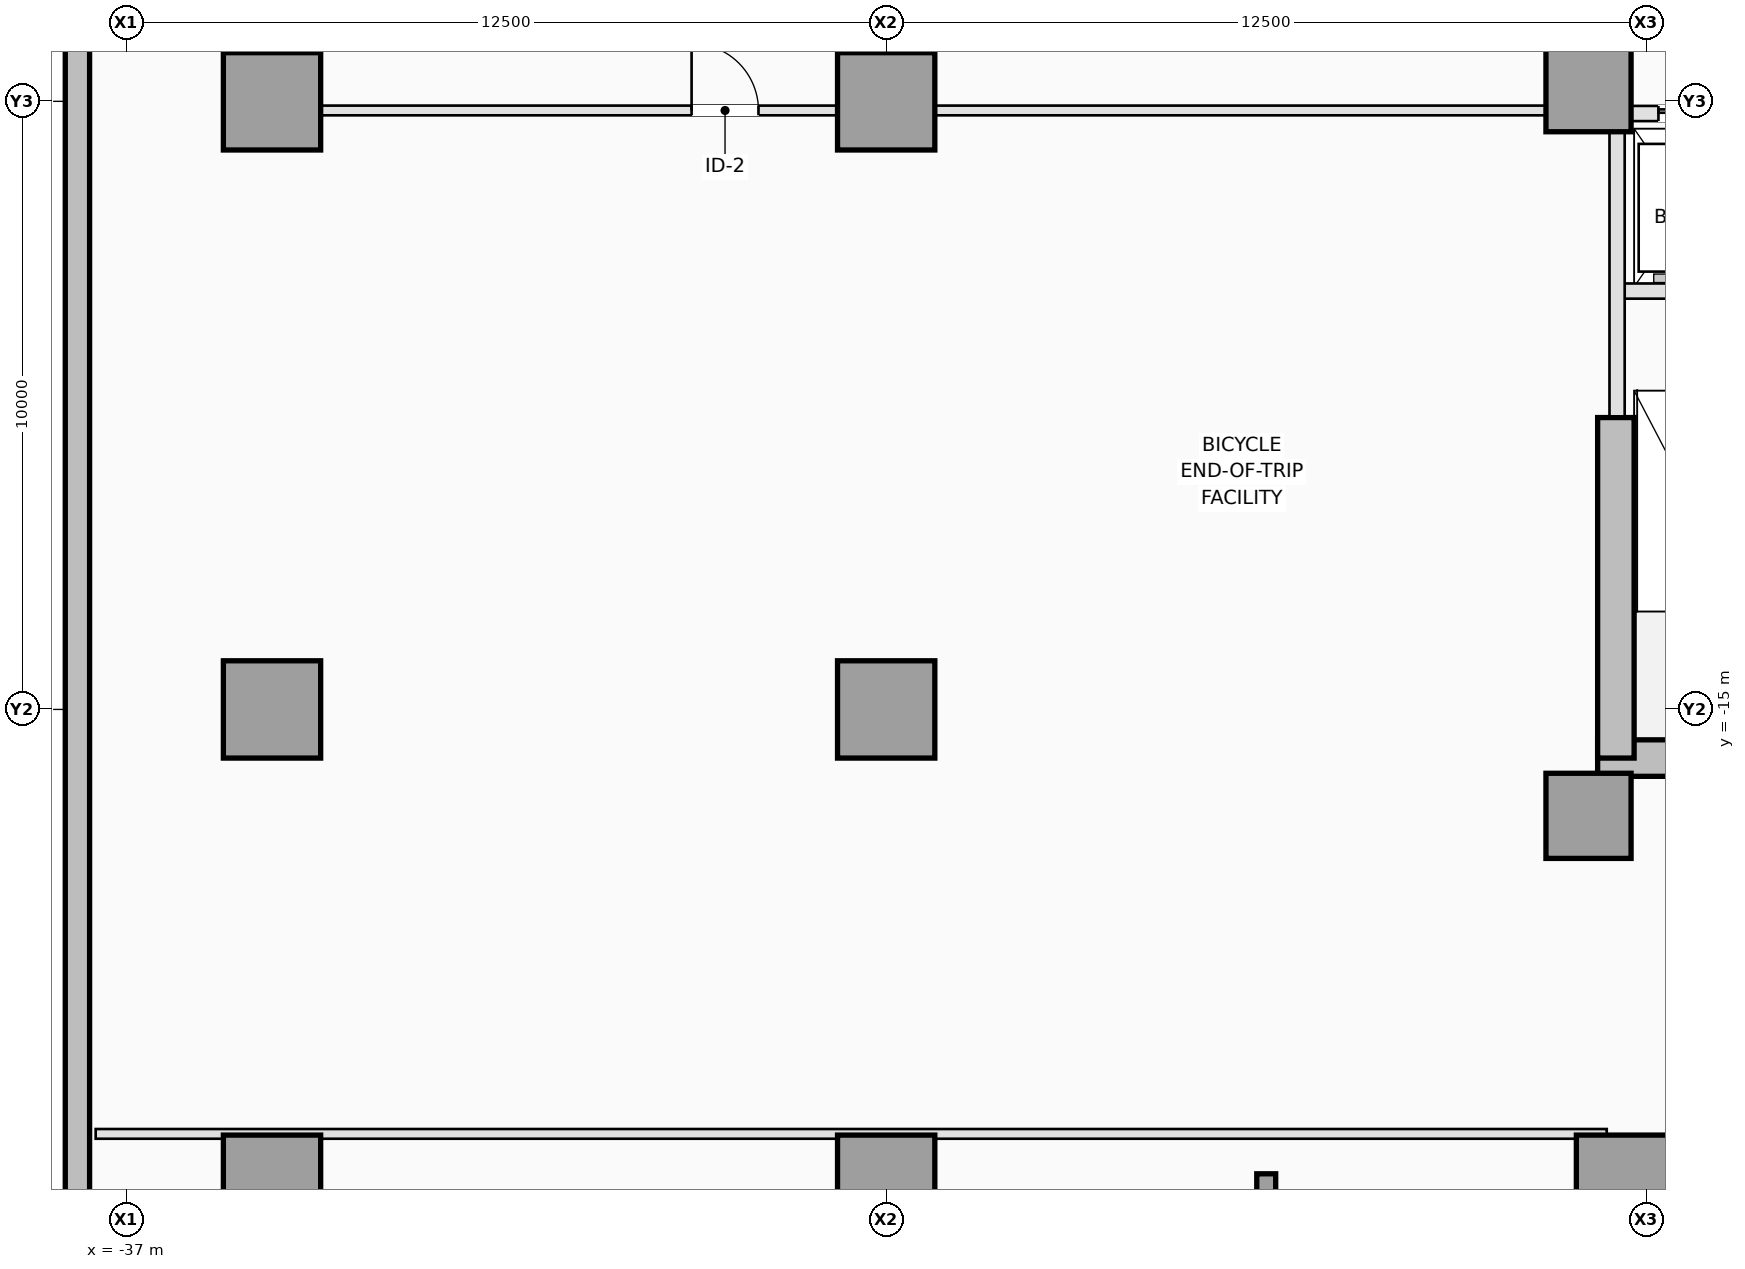
"""IFC4 building model, lengths in metres.
Left out: names, types, materials, properties, quantities, classifications, styles, units other than length and angle.
Written with IfcOpenShell. Run it as: python <this file> out.ifc"""

import sys

from ifc_helpers import new_model, si_unit, direction, frame, frame_2d, origin, origin_2d, place, context, subcontext, project, spatial, rectangle, i_section, extrude, element, fill, save


model = new_model("IFC4")
c1 = context("Model", 3, precision=1e-05, world=origin(), true_north=direction((0.0, 1.0)))
c2 = subcontext(c1, "Body", "Model", "MODEL_VIEW")
j1 = project(units=[si_unit("LENGTHUNIT", "METRE"), si_unit("PLANEANGLEUNIT", "RADIAN")], contexts=[c1])
p1 = place(None, origin())
s1 = spatial("IfcSite", under=j1, at=p1, CompositionType="ELEMENT")
p2 = place(p1, origin())
s2 = spatial("IfcBuilding", under=s1, at=p2, CompositionType="ELEMENT")
p3 = place(p2, frame((0.0, 0.0, -5.0)))
s3 = spatial("IfcBuildingStorey", under=s2, at=p3, CompositionType="ELEMENT", Elevation=-5.0)
p4 = place(p3, frame((-37.8, -25.817, 0.0), z_axis=(0.0, 0.0, 1.0), x_axis=(0.0, 1.0, 0.0)))
e1 = element("IfcWall", 1, at=p4, inside=s3, PredefinedType="USERDEFINED", context=c2, shape_type="SweptSolid", body=[
    extrude(rectangle(XDim=51.434, YDim=0.4, at=frame_2d((25.717, 0.0))), origin(), (0.0, 0.0, 1.0), 5.0),
])
p5 = place(p3, frame((-12.8, -15.8, 0.0), z_axis=(0.0, 0.0, 1.0), x_axis=(1.0, 0.0, 0.0)))
e2 = element("IfcWall", 2, at=p5, inside=s3, PredefinedType="SHEAR", context=c2, shape_type="SweptSolid", body=[
    extrude(rectangle(XDim=4.2, YDim=0.6, at=frame_2d((2.1, 0.0))), origin(), (0.0, 0.0, 1.0), 5.0),
])
p6 = place(p3, frame((-12.5, -15.8, 0.0), z_axis=(0.0, 0.0, 1.0), x_axis=(0.0, 1.0, 0.0)))
e3 = element("IfcWall", 3, at=p6, inside=s3, PredefinedType="SHEAR", context=c2, shape_type="SweptSolid", body=[
    extrude(rectangle(XDim=5.6, YDim=0.6, at=frame_2d((2.8, 0.0))), origin(), (0.0, 0.0, 1.0), 5.0),
])
for number, where, z_axis, x_axis in (
    (4, (-12.95, -16.75, 0.0), (0.0, 0.0, 1.0), (1.0, 0.0, 0.0)),
    (5, (-12.95, -4.8, 0.0), (0.0, 0.0, 1.0), (1.0, 0.0, 0.0)),
):
    element("IfcColumn", number, at=place(p3, frame(where, z_axis=z_axis, x_axis=x_axis)), inside=s3, PredefinedType="COLUMN", context=c2, shape_type="SweptSolid", body=[
        extrude(rectangle(XDim=1.4, YDim=1.4, at=origin_2d()), origin(), (0.0, 0.0, 1.0), 5.0),
    ])
for number, where, z_axis, x_axis in (
    (6, (-34.6, -22.8, 0.0), (0.0, 0.0, 1.0), (1.0, 0.0, 0.0)),
    (7, (-24.5, -22.8, 0.0), (0.0, 0.0, 1.0), (1.0, 0.0, 0.0)),
    (8, (-12.35, -22.8, 0.0), (0.0, 0.0, 1.0), (1.0, 0.0, 0.0)),
    (9, (-34.6, -15.0, 0.0), (0.0, 0.0, 1.0), (1.0, 0.0, 0.0)),
    (10, (-24.5, -15.0, 0.0), (0.0, 0.0, 1.0), (1.0, 0.0, 0.0)),
    (11, (-34.6, -5.0, 0.0), (0.0, 0.0, 1.0), (1.0, 0.0, 0.0)),
    (12, (-24.5, -5.0, 0.0), (0.0, 0.0, 1.0), (1.0, 0.0, 0.0)),
):
    element("IfcColumn", number, at=place(p3, frame(where, z_axis=z_axis, x_axis=x_axis)), inside=s3, PredefinedType="COLUMN", context=c2, shape_type="SweptSolid", body=[
        extrude(rectangle(XDim=1.6, YDim=1.6, at=origin_2d()), origin(), (0.0, 0.0, 1.0), 5.0),
    ])
p7 = place(p3, frame((-18.25, -22.8, 0.0), z_axis=(0.0, 0.0, 1.0), x_axis=(1.0, 0.0, 0.0)))
e13 = element("IfcColumn", 13, at=p7, inside=s3, PredefinedType="COLUMN", context=c2, shape_type="SweptSolid", body=[
    extrude(i_section(OverallWidth=0.311, OverallDepth=0.327, WebThickness=0.016, FlangeThickness=0.025, FilletRadius=0.017, at=origin_2d()), origin(), (0.0, 0.0, 1.0), 5.0),
])
p8 = place(p3, frame((-12.38, -8.12, 0.0), z_axis=(0.0, 0.0, 1.0), x_axis=(1.0, 0.0, 0.0)))
e14 = element("IfcWall", 14, at=p8, inside=s3, PredefinedType="PARTITIONING", context=c2, shape_type="SweptSolid", body=[
    extrude(rectangle(XDim=3.22, YDim=0.25, at=frame_2d((1.61, 0.0))), origin(), (0.0, 0.0, 1.0), 4.7),
])
p9 = place(p3, frame((-12.48, -10.18, 0.0), z_axis=(0.0, 0.0, 1.0), x_axis=(0.0, 1.0, 0.0)))
e15 = element("IfcWall", 15, at=p9, inside=s3, PredefinedType="PARTITIONING", context=c2, shape_type="SweptSolid", body=[
    extrude(rectangle(XDim=4.678, YDim=0.25, at=frame_2d((2.339, 0.0))), origin(), (0.0, 0.0, 1.0), 4.7),
])
p10 = place(p3, frame((-12.248, -5.2, 0.0), z_axis=(0.0, 0.0, 1.0), x_axis=(1.0, 0.0, 0.0)))
e16 = element("IfcWall", 16, at=p10, inside=s3, PredefinedType="PARTITIONING", context=c2, shape_type="SweptSolid", body=[
    extrude(rectangle(XDim=7.796, YDim=0.25, at=frame_2d((3.898, 0.0))), origin(), (0.0, 0.0, 1.0), 4.7),
])
p11 = place(p10, frame((0.448, 0.0, 0.0)))
e17 = element("IfcOpeningElement", 17, at=p11, cuts=e16, PredefinedType="OPENING", context=c2, shape_type="SweptSolid", body=[
    extrude(rectangle(XDim=1.0, YDim=2.15, at=frame_2d((0.5, 1.075))), frame((0.0, 0.135, 0.0), z_axis=(0.0, -1.0, 0.0), x_axis=(1.0, 0.0, 0.0)), (0.0, 0.0, 1.0), 0.27),
])
p12 = place(p10, frame((2.398, 0.0, 0.0)))
e18 = element("IfcOpeningElement", 18, at=p12, cuts=e16, PredefinedType="OPENING", context=c2, shape_type="SweptSolid", body=[
    extrude(rectangle(XDim=1.0, YDim=2.15, at=frame_2d((0.5, 1.075))), frame((0.0, 0.135, 0.0), z_axis=(0.0, -1.0, 0.0), x_axis=(1.0, 0.0, 0.0)), (0.0, 0.0, 1.0), 0.27),
])
p13 = place(p10, frame((4.348, 0.0, 0.0)))
e19 = element("IfcOpeningElement", 19, at=p13, cuts=e16, PredefinedType="OPENING", context=c2, shape_type="SweptSolid", body=[
    extrude(rectangle(XDim=1.0, YDim=2.15, at=frame_2d((0.5, 1.075))), frame((0.0, 0.135, 0.0), z_axis=(0.0, -1.0, 0.0), x_axis=(1.0, 0.0, 0.0)), (0.0, 0.0, 1.0), 0.27),
])
p14 = place(p10, frame((6.298, 0.0, 0.0)))
e20 = element("IfcOpeningElement", 20, at=p14, cuts=e16, PredefinedType="OPENING", context=c2, shape_type="SweptSolid", body=[
    extrude(rectangle(XDim=1.0, YDim=2.15, at=frame_2d((0.5, 1.075))), frame((0.0, 0.135, 0.0), z_axis=(0.0, -1.0, 0.0), x_axis=(1.0, 0.0, 0.0)), (0.0, 0.0, 1.0), 0.27),
])
p15 = place(p3, frame((-37.5, -21.98, 0.0), z_axis=(0.0, 0.0, 1.0), x_axis=(1.0, 0.0, 0.0)))
e21 = element("IfcWall", 21, at=p15, inside=s3, PredefinedType="PARTITIONING", context=c2, shape_type="SweptSolid", body=[
    extrude(rectangle(XDim=24.85, YDim=0.16, at=frame_2d((12.425, 0.0))), origin(), (0.0, 0.0, 1.0), 4.7),
])
p16 = place(p3, frame((-33.798, -5.15, 0.0), z_axis=(0.0, 0.0, 1.0), x_axis=(1.0, 0.0, 0.0)))
e22 = element("IfcWall", 22, at=p16, inside=s3, PredefinedType="PARTITIONING", context=c2, shape_type="SweptSolid", body=[
    extrude(rectangle(XDim=8.496, YDim=0.16, at=frame_2d((4.248, 0.0))), origin(), (0.0, 0.0, 1.0), 3.676),
])
p17 = place(p16, frame((6.098, 0.0, 0.0)))
e23 = element("IfcOpeningElement", 23, at=p17, cuts=e22, PredefinedType="OPENING", context=c2, shape_type="SweptSolid", body=[
    extrude(rectangle(XDim=1.1, YDim=2.15, at=frame_2d((0.55, 1.075))), frame((0.0, 0.09, 0.0), z_axis=(0.0, -1.0, 0.0), x_axis=(1.0, 0.0, 0.0)), (0.0, 0.0, 1.0), 0.18),
])
p18 = place(p3, frame((-23.698, -5.15, 0.0), z_axis=(0.0, 0.0, 1.0), x_axis=(1.0, 0.0, 0.0)))
e24 = element("IfcWall", 24, at=p18, inside=s3, PredefinedType="PARTITIONING", context=c2, shape_type="SweptSolid", body=[
    extrude(rectangle(XDim=10.046, YDim=0.16, at=frame_2d((5.023, 0.0))), origin(), (0.0, 0.0, 1.0), 3.676),
])
p19 = place(p11, origin())
e25 = element("IfcDoor", 25, at=p19, inside=s3, OperationType="SLIDING_TO_LEFT", PredefinedType="DOOR", context=c2, shape_type="SweptSolid", body=[
    extrude(rectangle(XDim=1.0, YDim=2.15, at=frame_2d((0.5, 1.075))), frame((0.0, 0.025, 0.0), z_axis=(0.0, -1.0, 0.0), x_axis=(1.0, 0.0, 0.0)), (0.0, 0.0, 1.0), 0.05),
])
fill(e17, e25)
p20 = place(p17, origin())
e26 = element("IfcDoor", 26, at=p20, inside=s3, OperationType="SINGLE_SWING_LEFT", PredefinedType="DOOR", context=c2, shape_type="SweptSolid", body=[
    extrude(rectangle(XDim=1.1, YDim=2.15, at=frame_2d((0.55, 1.075))), frame((0.0, 0.025, 0.0), z_axis=(0.0, -1.0, 0.0), x_axis=(1.0, 0.0, 0.0)), (0.0, 0.0, 1.0), 0.05),
])
fill(e23, e26)
save(model, sys.argv[1])
